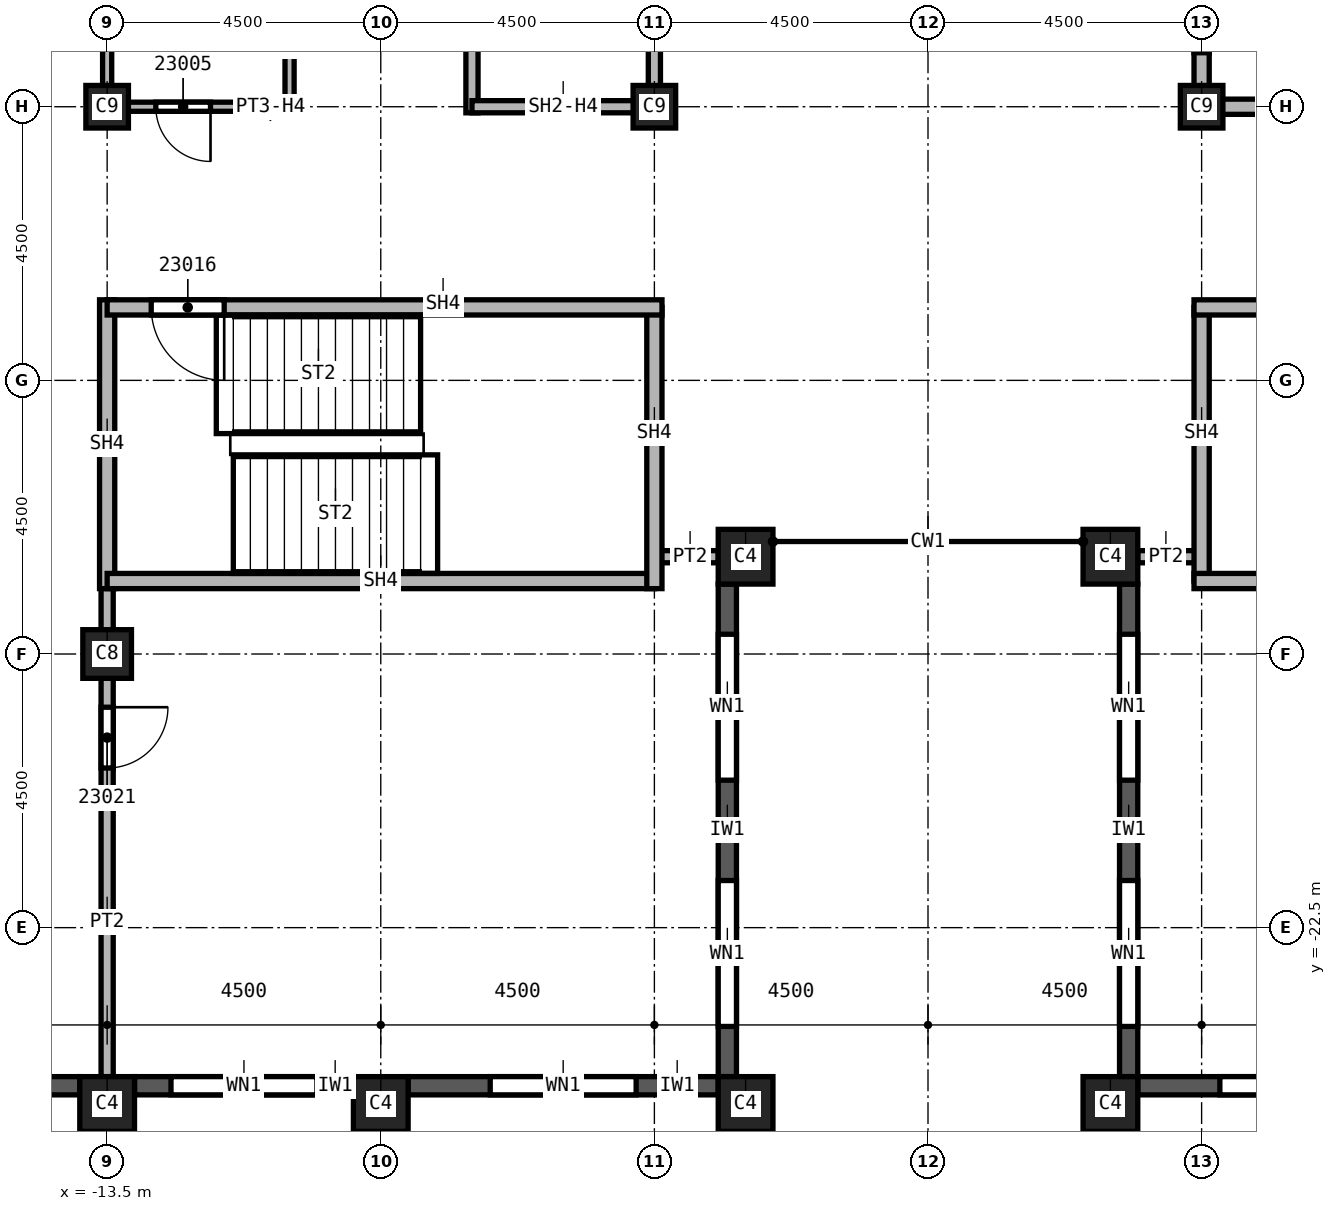
"""IFC4 building model, lengths in metres.
Left out: names, types, materials, properties, quantities, classifications, styles, units other than length and angle.
Written with IfcOpenShell. Run it as: python <this file> out.ifc"""

import sys

from ifc_helpers import new_model, si_unit, direction, frame, frame_2d, origin, origin_2d, place, context, subcontext, project, spatial, rectangle, extrude, element, fill, save


model = new_model("IFC4")
c1 = context("Model", 3, precision=1e-05, world=origin(), true_north=direction((0.0, 1.0)))
c2 = subcontext(c1, "Body", "Model", "MODEL_VIEW")
j1 = project(units=[si_unit("LENGTHUNIT", "METRE"), si_unit("PLANEANGLEUNIT", "RADIAN")], contexts=[c1])
p1 = place(None, origin())
s1 = spatial("IfcSite", under=j1, at=p1, CompositionType="ELEMENT")
p2 = place(p1, origin())
s2 = spatial("IfcBuilding", under=s1, at=p2, CompositionType="ELEMENT")
p3 = place(p2, frame((0.0, 0.0, 330.0)))
s3 = spatial("IfcBuildingStorey", under=s2, at=p3, CompositionType="ELEMENT", Elevation=330.0)
p4 = place(p3, frame((-13.5, -18.0, 0.0), z_axis=(0.0, 0.0, 1.0), x_axis=(1.0, 0.0, 0.0)))
e1 = element("IfcColumn", 1, at=p4, inside=s3, PredefinedType="COLUMN", context=c2, shape_type="SweptSolid", body=[
    extrude(rectangle(XDim=0.8, YDim=0.8, at=origin_2d()), origin(), (0.0, 0.0, 1.0), 3.74),
])
for number, where, z_axis, x_axis in (
    (2, (4.5, -9.0, 0.0), (0.0, 0.0, 1.0), (1.0, 0.0, 0.0)),
    (3, (-4.5, -9.0, 0.0), (0.0, 0.0, 1.0), (1.0, 0.0, 0.0)),
    (4, (-13.5, -9.0, 0.0), (0.0, 0.0, 1.0), (1.0, 0.0, 0.0)),
):
    element("IfcColumn", number, at=place(p3, frame(where, z_axis=z_axis, x_axis=x_axis)), inside=s3, PredefinedType="COLUMN", context=c2, shape_type="SweptSolid", body=[
        extrude(rectangle(XDim=0.7, YDim=0.7, at=origin_2d()), origin(), (0.0, 0.0, 1.0), 3.74),
    ])
for number, where, z_axis, x_axis in (
    (5, (3.0, -25.4, 0.0), (0.0, 0.0, 1.0), (1.0, 0.0, 0.0)),
    (6, (-3.0, -25.4, 0.0), (0.0, 0.0, 1.0), (1.0, 0.0, 0.0)),
    (7, (-9.0, -25.4, 0.0), (0.0, 0.0, 1.0), (1.0, 0.0, 0.0)),
    (8, (-13.5, -25.4, 0.0), (0.0, 0.0, 1.0), (1.0, 0.0, 0.0)),
    (9, (3.0, -16.4, 0.0), (0.0, 0.0, 1.0), (1.0, 0.0, 0.0)),
    (10, (-3.0, -16.4, 0.0), (0.0, 0.0, 1.0), (1.0, 0.0, 0.0)),
):
    element("IfcColumn", number, at=place(p3, frame(where, z_axis=z_axis, x_axis=x_axis)), inside=s3, PredefinedType="COLUMN", context=c2, shape_type="SweptSolid", body=[
        extrude(rectangle(XDim=0.9, YDim=0.9, at=origin_2d()), origin(), (0.0, 0.0, 1.0), 3.74),
    ])
p5 = place(p3, frame((-17.55, -25.1, 0.0), z_axis=(0.0, 0.0, 1.0), x_axis=(1.0, 0.0, 0.0)))
e11 = element("IfcWall", 11, at=p5, inside=s3, PredefinedType="SOLIDWALL", context=c2, shape_type="SweptSolid", body=[
    extrude(rectangle(XDim=3.6, YDim=0.3, at=frame_2d((1.8, 0.0))), origin(), (0.0, 0.0, 1.0), 3.14),
])
p6 = place(p5, frame((0.775, 0.0, 0.8)))
e12 = element("IfcOpeningElement", 12, at=p6, cuts=e11, PredefinedType="OPENING", context=c2, shape_type="SweptSolid", body=[
    extrude(rectangle(XDim=1.0, YDim=1.95, at=frame_2d((0.5, 0.975))), frame((0.0, 0.15, 0.0), z_axis=(0.0, -1.0, 0.0), x_axis=(1.0, 0.0, 0.0)), (0.0, 0.0, 1.0), 0.3),
])
p7 = place(p5, frame((2.375, 0.0, 0.8)))
e13 = element("IfcOpeningElement", 13, at=p7, cuts=e11, PredefinedType="OPENING", context=c2, shape_type="SweptSolid", body=[
    extrude(rectangle(XDim=0.6, YDim=1.95, at=frame_2d((0.3, 0.975))), frame((0.0, 0.15, 0.0), z_axis=(0.0, -1.0, 0.0), x_axis=(1.0, 0.0, 0.0)), (0.0, 0.0, 1.0), 0.3),
])
p8 = place(p3, frame((-13.05, -25.1, 0.0), z_axis=(0.0, 0.0, 1.0), x_axis=(1.0, 0.0, 0.0)))
e14 = element("IfcWall", 14, at=p8, inside=s3, PredefinedType="SOLIDWALL", context=c2, shape_type="SweptSolid", body=[
    extrude(rectangle(XDim=3.6, YDim=0.3, at=frame_2d((1.8, 0.0))), origin(), (0.0, 0.0, 1.0), 3.14),
])
p9 = place(p8, frame((0.6, 0.0, 0.8)))
e15 = element("IfcOpeningElement", 15, at=p9, cuts=e14, PredefinedType="OPENING", context=c2, shape_type="SweptSolid", body=[
    extrude(rectangle(XDim=2.4, YDim=1.95, at=frame_2d((1.2, 0.975))), frame((0.0, 0.15, 0.0), z_axis=(0.0, -1.0, 0.0), x_axis=(1.0, 0.0, 0.0)), (0.0, 0.0, 1.0), 0.3),
])
p10 = place(p3, frame((-8.55, -25.1, 0.0), z_axis=(0.0, 0.0, 1.0), x_axis=(1.0, 0.0, 0.0)))
e16 = element("IfcWall", 16, at=p10, inside=s3, PredefinedType="SOLIDWALL", context=c2, shape_type="SweptSolid", body=[
    extrude(rectangle(XDim=5.1, YDim=0.3, at=frame_2d((2.55, 0.0))), origin(), (0.0, 0.0, 1.0), 3.14),
])
p11 = place(p10, frame((1.35, 0.0, 0.8)))
e17 = element("IfcOpeningElement", 17, at=p11, cuts=e16, PredefinedType="OPENING", context=c2, shape_type="SweptSolid", body=[
    extrude(rectangle(XDim=2.4, YDim=1.95, at=frame_2d((1.2, 0.975))), frame((0.0, 0.15, 0.0), z_axis=(0.0, -1.0, 0.0), x_axis=(1.0, 0.0, 0.0)), (0.0, 0.0, 1.0), 0.3),
])
p12 = place(p3, frame((-3.3, -24.95, 0.0), z_axis=(0.0, 0.0, 1.0), x_axis=(0.0, 1.0, 0.0)))
e18 = element("IfcWall", 18, at=p12, inside=s3, PredefinedType="SOLIDWALL", context=c2, shape_type="SweptSolid", body=[
    extrude(rectangle(XDim=8.1, YDim=0.3, at=frame_2d((4.05, 0.0))), origin(), (0.0, 0.0, 1.0), 3.14),
])
p13 = place(p12, frame((0.825, 0.0, 0.8)))
e19 = element("IfcOpeningElement", 19, at=p13, cuts=e18, PredefinedType="OPENING", context=c2, shape_type="SweptSolid", body=[
    extrude(rectangle(XDim=2.4, YDim=1.95, at=frame_2d((1.2, 0.975))), frame((0.0, 0.15, 0.0), z_axis=(0.0, -1.0, 0.0), x_axis=(1.0, 0.0, 0.0)), (0.0, 0.0, 1.0), 0.3),
])
p14 = place(p12, frame((4.875, 0.0, 0.8)))
e20 = element("IfcOpeningElement", 20, at=p14, cuts=e18, PredefinedType="OPENING", context=c2, shape_type="SweptSolid", body=[
    extrude(rectangle(XDim=2.4, YDim=1.95, at=frame_2d((1.2, 0.975))), frame((0.0, 0.15, 0.0), z_axis=(0.0, -1.0, 0.0), x_axis=(1.0, 0.0, 0.0)), (0.0, 0.0, 1.0), 0.3),
])
p15 = place(p3, frame((3.3, -16.85, 0.0), z_axis=(0.0, 0.0, 1.0), x_axis=(0.0, -1.0, 0.0)))
e21 = element("IfcWall", 21, at=p15, inside=s3, PredefinedType="SOLIDWALL", context=c2, shape_type="SweptSolid", body=[
    extrude(rectangle(XDim=8.1, YDim=0.3, at=frame_2d((4.05, 0.0))), origin(), (0.0, 0.0, 1.0), 3.14),
])
p16 = place(p15, frame((0.825, 0.0, 0.8)))
e22 = element("IfcOpeningElement", 22, at=p16, cuts=e21, PredefinedType="OPENING", context=c2, shape_type="SweptSolid", body=[
    extrude(rectangle(XDim=2.4, YDim=1.95, at=frame_2d((1.2, 0.975))), frame((0.0, 0.15, 0.0), z_axis=(0.0, -1.0, 0.0), x_axis=(1.0, 0.0, 0.0)), (0.0, 0.0, 1.0), 0.3),
])
p17 = place(p15, frame((4.875, 0.0, 0.8)))
e23 = element("IfcOpeningElement", 23, at=p17, cuts=e21, PredefinedType="OPENING", context=c2, shape_type="SweptSolid", body=[
    extrude(rectangle(XDim=2.4, YDim=1.95, at=frame_2d((1.2, 0.975))), frame((0.0, 0.15, 0.0), z_axis=(0.0, -1.0, 0.0), x_axis=(1.0, 0.0, 0.0)), (0.0, 0.0, 1.0), 0.3),
])
p18 = place(p3, frame((3.45, -25.1, 0.0), z_axis=(0.0, 0.0, 1.0), x_axis=(1.0, 0.0, 0.0)))
e24 = element("IfcWall", 24, at=p18, inside=s3, PredefinedType="SOLIDWALL", context=c2, shape_type="SweptSolid", body=[
    extrude(rectangle(XDim=5.1, YDim=0.3, at=frame_2d((2.55, 0.0))), origin(), (0.0, 0.0, 1.0), 3.14),
])
p19 = place(p18, frame((1.35, 0.0, 0.8)))
e25 = element("IfcOpeningElement", 25, at=p19, cuts=e24, PredefinedType="OPENING", context=c2, shape_type="SweptSolid", body=[
    extrude(rectangle(XDim=2.4, YDim=1.95, at=frame_2d((1.2, 0.975))), frame((0.0, 0.15, 0.0), z_axis=(0.0, -1.0, 0.0), x_axis=(1.0, 0.0, 0.0)), (0.0, 0.0, 1.0), 0.3),
])
p20 = place(p3, frame((-13.5, -16.675, 0.0), z_axis=(0.0, 0.0, 1.0), x_axis=(0.0, -1.0, 0.0)))
e26 = element("IfcWall", 26, at=p20, inside=s3, PredefinedType="PARTITIONING", context=c2, shape_type="SweptSolid", body=[
    extrude(rectangle(XDim=8.275, YDim=0.2, at=frame_2d((4.137, 0.0))), origin(), (0.0, 0.0, 1.0), 3.74),
])
p21 = place(p20, frame((2.2, 0.0, 0.0)))
e27 = element("IfcOpeningElement", 27, at=p21, cuts=e26, PredefinedType="OPENING", context=c2, shape_type="SweptSolid", body=[
    extrude(rectangle(XDim=1.0, YDim=2.1, at=frame_2d((0.5, 1.05))), frame((0.0, 0.1, 0.0), z_axis=(0.0, -1.0, 0.0), x_axis=(1.0, 0.0, 0.0)), (0.0, 0.0, 1.0), 0.2),
])
for number, where, z_axis, x_axis in (
    (28, (-3.45, -16.4, 0.0), (0.0, 0.0, 1.0), (-1.0, 0.0, 0.0)),
    (29, (4.5, -16.4, 0.0), (0.0, 0.0, 1.0), (-1.0, 0.0, 0.0)),
):
    element("IfcWall", number, at=place(p3, frame(where, z_axis=z_axis, x_axis=x_axis)), inside=s3, PredefinedType="PARTITIONING", context=c2, shape_type="SweptSolid", body=[
        extrude(rectangle(XDim=1.05, YDim=0.2, at=frame_2d((0.525, 0.0))), origin(), (0.0, 0.0, 1.0), 3.74),
    ])
p22 = place(p3, frame((-7.5, -9.1, 0.0), z_axis=(0.0, 0.0, 1.0), x_axis=(0.0, 1.0, 0.0)))
e30 = element("IfcWall", 30, at=p22, inside=s3, PredefinedType="SOLIDWALL", context=c2, shape_type="SweptSolid", body=[
    extrude(rectangle(XDim=6.225, YDim=0.2, at=frame_2d((3.113, 0.0))), origin(), (0.0, 0.0, 1.0), 3.74),
])
p23 = place(p3, frame((-4.5, -9.0, 0.0), z_axis=(0.0, 0.0, 1.0), x_axis=(-1.0, 0.0, 0.0)))
e31 = element("IfcWall", 31, at=p23, inside=s3, PredefinedType="SOLIDWALL", context=c2, shape_type="SweptSolid", body=[
    extrude(rectangle(XDim=3.0, YDim=0.2, at=frame_2d((1.5, 0.0))), origin(), (0.0, 0.0, 1.0), 3.062),
])
p24 = place(p3, frame((-4.5, 6.0, 0.0), z_axis=(0.0, 0.0, 1.0), x_axis=(0.0, -1.0, 0.0)))
e32 = element("IfcWall", 32, at=p24, inside=s3, PredefinedType="SOLIDWALL", context=c2, shape_type="SweptSolid", body=[
    extrude(rectangle(XDim=15.1, YDim=0.2, at=frame_2d((7.55, 0.0))), origin(), (0.0, 0.0, 1.0), 3.062),
])
p25 = place(p24, frame((12.25, 0.0, 0.0)))
e33 = element("IfcOpeningElement", 33, at=p25, cuts=e32, PredefinedType="OPENING", context=c2, shape_type="SweptSolid", body=[
    extrude(rectangle(XDim=1.1, YDim=2.1, at=frame_2d((0.55, 1.05))), frame((0.0, 0.1, 0.0), z_axis=(0.0, -1.0, 0.0), x_axis=(1.0, 0.0, 0.0)), (0.0, 0.0, 1.0), 0.2),
])
p26 = place(p24, frame((8.2, 0.0, 0.0)))
e34 = element("IfcOpeningElement", 34, at=p26, cuts=e32, PredefinedType="OPENING", context=c2, shape_type="SweptSolid", body=[
    extrude(rectangle(XDim=1.1, YDim=2.1, at=frame_2d((0.55, 1.05))), frame((0.0, 0.1, 0.0), z_axis=(0.0, -1.0, 0.0), x_axis=(1.0, 0.0, 0.0)), (0.0, 0.0, 1.0), 0.2),
])
p27 = place(p3, frame((4.5, -9.125, 0.0), z_axis=(0.0, 0.0, 1.0), x_axis=(0.0, 1.0, 0.0)))
e35 = element("IfcWall", 35, at=p27, inside=s3, PredefinedType="SOLIDWALL", context=c2, shape_type="SweptSolid", body=[
    extrude(rectangle(XDim=3.125, YDim=0.25, at=frame_2d((1.562, 0.0))), origin(), (0.0, 0.0, 1.0), 3.062),
])
p28 = place(p27, frame((1.012, 0.0, 0.0)))
e36 = element("IfcOpeningElement", 36, at=p28, cuts=e35, PredefinedType="OPENING", context=c2, shape_type="SweptSolid", body=[
    extrude(rectangle(XDim=1.1, YDim=2.1, at=frame_2d((0.55, 1.05))), frame((0.0, 0.125, 0.0), z_axis=(0.0, -1.0, 0.0), x_axis=(1.0, 0.0, 0.0)), (0.0, 0.0, 1.0), 0.25),
])
p29 = place(p3, frame((7.5, -9.0, 0.0), z_axis=(0.0, 0.0, 1.0), x_axis=(-1.0, 0.0, 0.0)))
e37 = element("IfcWall", 37, at=p29, inside=s3, PredefinedType="SOLIDWALL", context=c2, shape_type="SweptSolid", body=[
    extrude(rectangle(XDim=3.0, YDim=0.25, at=frame_2d((1.5, 0.0))), origin(), (0.0, 0.0, 1.0), 3.062),
])
p30 = place(p3, frame((-13.5, -12.175, 0.0), z_axis=(0.0, 0.0, 1.0), x_axis=(0.0, -1.0, 0.0)))
e38 = element("IfcWall", 38, at=p30, inside=s3, PredefinedType="SOLIDWALL", context=c2, shape_type="SweptSolid", body=[
    extrude(rectangle(XDim=4.75, YDim=0.25, at=frame_2d((2.375, 0.0))), origin(), (0.0, 0.0, 1.0), 3.74),
])
p31 = place(p3, frame((-4.5, -16.8, 0.0), z_axis=(0.0, 0.0, 1.0), x_axis=(-1.0, 0.0, 0.0)))
e39 = element("IfcWall", 39, at=p31, inside=s3, PredefinedType="SOLIDWALL", context=c2, shape_type="SweptSolid", body=[
    extrude(rectangle(XDim=9.0, YDim=0.25, at=frame_2d((4.5, 0.0))), origin(), (0.0, 0.0, 1.0), 3.74),
])
p32 = place(p3, frame((-4.5, -12.3, 0.0), z_axis=(0.0, 0.0, 1.0), x_axis=(0.0, -1.0, 0.0)))
e40 = element("IfcWall", 40, at=p32, inside=s3, PredefinedType="SOLIDWALL", context=c2, shape_type="SweptSolid", body=[
    extrude(rectangle(XDim=4.625, YDim=0.25, at=frame_2d((2.312, 0.0))), origin(), (0.0, 0.0, 1.0), 3.74),
])
p33 = place(p3, frame((-4.375, -12.3, 0.0), z_axis=(0.0, 0.0, 1.0), x_axis=(-1.0, 0.0, 0.0)))
e41 = element("IfcWall", 41, at=p33, inside=s3, PredefinedType="SOLIDWALL", context=c2, shape_type="SweptSolid", body=[
    extrude(rectangle(XDim=9.125, YDim=0.25, at=frame_2d((4.562, 0.0))), origin(), (0.0, 0.0, 1.0), 3.74),
])
p34 = place(p33, frame((7.2, 0.0, 0.0)))
e42 = element("IfcOpeningElement", 42, at=p34, cuts=e41, PredefinedType="OPENING", context=c2, shape_type="SweptSolid", body=[
    extrude(rectangle(XDim=1.2, YDim=2.1, at=frame_2d((0.6, 1.05))), frame((0.0, 0.125, 0.0), z_axis=(0.0, -1.0, 0.0), x_axis=(1.0, 0.0, 0.0)), (0.0, 0.0, 1.0), 0.25),
])
p35 = place(p3, frame((4.5, -16.8, 0.0), z_axis=(0.0, 0.0, 1.0), x_axis=(0.0, 1.0, 0.0)))
e43 = element("IfcWall", 43, at=p35, inside=s3, PredefinedType="SOLIDWALL", context=c2, shape_type="SweptSolid", body=[
    extrude(rectangle(XDim=4.5, YDim=0.25, at=frame_2d((2.25, 0.0))), origin(), (0.0, 0.0, 1.0), 3.74),
])
p36 = place(p3, frame((13.5, -16.8, 0.0), z_axis=(0.0, 0.0, 1.0), x_axis=(-1.0, 0.0, 0.0)))
e44 = element("IfcWall", 44, at=p36, inside=s3, PredefinedType="SOLIDWALL", context=c2, shape_type="SweptSolid", body=[
    extrude(rectangle(XDim=9.125, YDim=0.25, at=frame_2d((4.562, 0.0))), origin(), (0.0, 0.0, 1.0), 3.74),
])
p37 = place(p3, frame((13.5, -12.3, 0.0), z_axis=(0.0, 0.0, 1.0), x_axis=(-1.0, 0.0, 0.0)))
e45 = element("IfcWall", 45, at=p37, inside=s3, PredefinedType="SOLIDWALL", context=c2, shape_type="SweptSolid", body=[
    extrude(rectangle(XDim=9.125, YDim=0.25, at=frame_2d((4.562, 0.0))), origin(), (0.0, 0.0, 1.0), 3.74),
])
p38 = place(p37, frame((0.6, 0.0, 0.0)))
e46 = element("IfcOpeningElement", 46, at=p38, cuts=e45, PredefinedType="OPENING", context=c2, shape_type="SweptSolid", body=[
    extrude(rectangle(XDim=1.2, YDim=2.1, at=frame_2d((0.6, 1.05))), frame((0.0, 0.125, 0.0), z_axis=(0.0, -1.0, 0.0), x_axis=(1.0, 0.0, 0.0)), (0.0, 0.0, 1.0), 0.25),
])
p39 = place(p3, frame((-13.5, -9.075, 0.0), z_axis=(0.0, 0.0, 1.0), x_axis=(0.0, 1.0, 0.0)))
e47 = element("IfcWall", 47, at=p39, inside=s3, PredefinedType="PARTITIONING", context=c2, shape_type="SweptSolid", body=[
    extrude(rectangle(XDim=2.075, YDim=0.15, at=frame_2d((1.038, 0.0))), origin(), (0.0, 0.0, 1.0), 3.062),
])
p40 = place(p3, frame((-10.5, -9.075, 0.0), z_axis=(0.0, 0.0, 1.0), x_axis=(0.0, 1.0, 0.0)))
e48 = element("IfcWall", 48, at=p40, inside=s3, PredefinedType="PARTITIONING", context=c2, shape_type="SweptSolid", body=[
    extrude(rectangle(XDim=2.15, YDim=0.15, at=frame_2d((1.075, 0.0))), origin(), (0.0, 0.0, 1.0), 3.74),
])
p41 = place(p3, frame((-10.5, -9.0, 0.0), z_axis=(0.0, 0.0, 1.0), x_axis=(-1.0, 0.0, 0.0)))
e49 = element("IfcWall", 49, at=p41, inside=s3, PredefinedType="PARTITIONING", context=c2, shape_type="SweptSolid", body=[
    extrude(rectangle(XDim=3.0, YDim=0.15, at=frame_2d((1.5, 0.0))), origin(), (0.0, 0.0, 1.0), 3.062),
])
p42 = place(p41, frame((1.3, 0.0, 0.0)))
e50 = element("IfcOpeningElement", 50, at=p42, cuts=e49, PredefinedType="OPENING", context=c2, shape_type="SweptSolid", body=[
    extrude(rectangle(XDim=0.9, YDim=2.1, at=frame_2d((0.45, 1.05))), frame((0.0, 0.075, 0.0), z_axis=(0.0, -1.0, 0.0), x_axis=(1.0, 0.0, 0.0)), (0.0, 0.0, 1.0), 0.15),
])
p43 = place(p9, origin())
e51 = element("IfcWindow", 51, at=p43, inside=s3, PartitioningType="SINGLE_PANEL", PredefinedType="WINDOW", context=c2, shape_type="SweptSolid", body=[
    extrude(rectangle(XDim=2.4, YDim=1.95, at=frame_2d((1.2, 0.975))), frame((0.0, 0.03, 0.0), z_axis=(0.0, -1.0, 0.0), x_axis=(1.0, 0.0, 0.0)), (0.0, 0.0, 1.0), 0.06),
])
fill(e15, e51)
p44 = place(p11, origin())
e52 = element("IfcWindow", 52, at=p44, inside=s3, PartitioningType="SINGLE_PANEL", PredefinedType="WINDOW", context=c2, shape_type="SweptSolid", body=[
    extrude(rectangle(XDim=2.4, YDim=1.95, at=frame_2d((1.2, 0.975))), frame((0.0, 0.03, 0.0), z_axis=(0.0, -1.0, 0.0), x_axis=(1.0, 0.0, 0.0)), (0.0, 0.0, 1.0), 0.06),
])
fill(e17, e52)
p45 = place(p13, origin())
e53 = element("IfcWindow", 53, at=p45, inside=s3, PartitioningType="SINGLE_PANEL", PredefinedType="WINDOW", context=c2, shape_type="SweptSolid", body=[
    extrude(rectangle(XDim=2.4, YDim=1.95, at=frame_2d((1.2, 0.975))), frame((0.0, 0.03, 0.0), z_axis=(0.0, -1.0, 0.0), x_axis=(1.0, 0.0, 0.0)), (0.0, 0.0, 1.0), 0.06),
])
fill(e19, e53)
p46 = place(p14, origin())
e54 = element("IfcWindow", 54, at=p46, inside=s3, PartitioningType="SINGLE_PANEL", PredefinedType="WINDOW", context=c2, shape_type="SweptSolid", body=[
    extrude(rectangle(XDim=2.4, YDim=1.95, at=frame_2d((1.2, 0.975))), frame((0.0, 0.03, 0.0), z_axis=(0.0, -1.0, 0.0), x_axis=(1.0, 0.0, 0.0)), (0.0, 0.0, 1.0), 0.06),
])
fill(e20, e54)
p47 = place(p16, origin())
e55 = element("IfcWindow", 55, at=p47, inside=s3, PartitioningType="SINGLE_PANEL", PredefinedType="WINDOW", context=c2, shape_type="SweptSolid", body=[
    extrude(rectangle(XDim=2.4, YDim=1.95, at=frame_2d((1.2, 0.975))), frame((0.0, 0.03, 0.0), z_axis=(0.0, -1.0, 0.0), x_axis=(1.0, 0.0, 0.0)), (0.0, 0.0, 1.0), 0.06),
])
fill(e22, e55)
p48 = place(p17, origin())
e56 = element("IfcWindow", 56, at=p48, inside=s3, PartitioningType="SINGLE_PANEL", PredefinedType="WINDOW", context=c2, shape_type="SweptSolid", body=[
    extrude(rectangle(XDim=2.4, YDim=1.95, at=frame_2d((1.2, 0.975))), frame((0.0, 0.03, 0.0), z_axis=(0.0, -1.0, 0.0), x_axis=(1.0, 0.0, 0.0)), (0.0, 0.0, 1.0), 0.06),
])
fill(e23, e56)
p49 = place(p19, origin())
e57 = element("IfcWindow", 57, at=p49, inside=s3, PartitioningType="SINGLE_PANEL", PredefinedType="WINDOW", context=c2, shape_type="SweptSolid", body=[
    extrude(rectangle(XDim=2.4, YDim=1.95, at=frame_2d((1.2, 0.975))), frame((0.0, 0.03, 0.0), z_axis=(0.0, -1.0, 0.0), x_axis=(1.0, 0.0, 0.0)), (0.0, 0.0, 1.0), 0.06),
])
fill(e25, e57)
p50 = place(p42, origin())
e58 = element("IfcDoor", 58, at=p50, inside=s3, OperationType="SINGLE_SWING_RIGHT", PredefinedType="DOOR", context=c2, shape_type="SweptSolid", body=[
    extrude(rectangle(XDim=0.9, YDim=2.1, at=frame_2d((0.45, 1.05))), frame((0.0, 0.025, 0.0), z_axis=(0.0, -1.0, 0.0), x_axis=(1.0, 0.0, 0.0)), (0.0, 0.0, 1.0), 0.05),
])
fill(e50, e58)
p51 = place(p34, origin())
e59 = element("IfcDoor", 59, at=p51, inside=s3, OperationType="SINGLE_SWING_LEFT", PredefinedType="DOOR", context=c2, shape_type="SweptSolid", body=[
    extrude(rectangle(XDim=1.2, YDim=2.1, at=frame_2d((0.6, 1.05))), frame((0.0, 0.025, 0.0), z_axis=(0.0, -1.0, 0.0), x_axis=(1.0, 0.0, 0.0)), (0.0, 0.0, 1.0), 0.05),
])
fill(e42, e59)
p52 = place(p21, origin())
e60 = element("IfcDoor", 60, at=p52, inside=s3, OperationType="SINGLE_SWING_RIGHT", PredefinedType="DOOR", context=c2, shape_type="SweptSolid", body=[
    extrude(rectangle(XDim=1.0, YDim=2.1, at=frame_2d((0.5, 1.05))), frame((0.0, 0.025, 0.0), z_axis=(0.0, -1.0, 0.0), x_axis=(1.0, 0.0, 0.0)), (0.0, 0.0, 1.0), 0.05),
])
fill(e27, e60)
p53 = place(p28, origin())
e61 = element("IfcDoor", 61, at=p53, inside=s3, OperationType="SLIDING_TO_LEFT", PredefinedType="DOOR", context=c2, shape_type="SweptSolid", body=[
    extrude(rectangle(XDim=1.1, YDim=2.1, at=frame_2d((0.55, 1.05))), frame((0.0, 0.025, 0.0), z_axis=(0.0, -1.0, 0.0), x_axis=(1.0, 0.0, 0.0)), (0.0, 0.0, 1.0), 0.05),
])
fill(e36, e61)
save(model, sys.argv[1])
